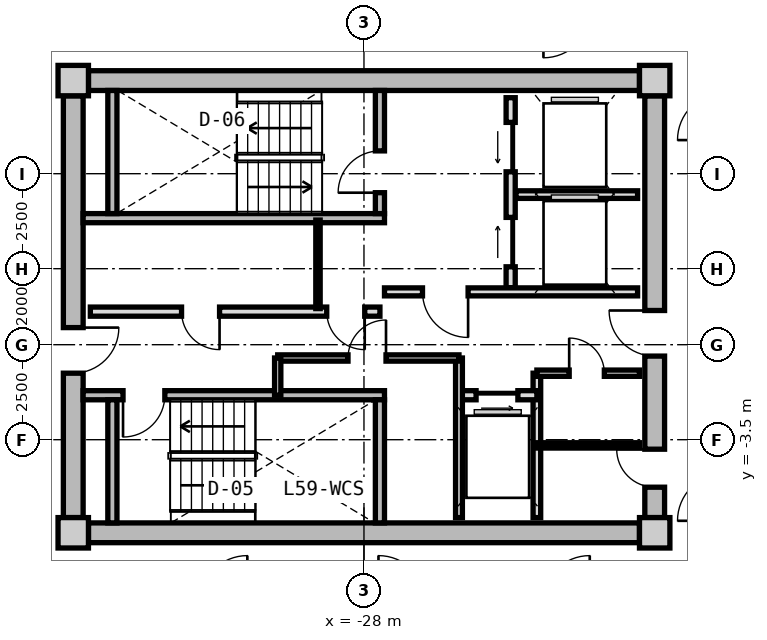
"""IFC4 building model, lengths in metres.
Left out: names, types, materials, properties, quantities, classifications, styles, units other than length and angle.
Written with IfcOpenShell. Run it as: python <this file> out.ifc"""

import sys

from ifc_helpers import new_model, si_unit, direction, frame, frame_2d, origin, origin_2d, place, context, subcontext, project, spatial, rectangle, extrude, source, transform, mapped, element, fill, save


model = new_model("IFC4")
c1 = context("Model", 3, precision=1e-05, world=origin(), true_north=direction((0.0, 1.0)))
c2 = subcontext(c1, "Body", "Model", "MODEL_VIEW")
j1 = project(units=[si_unit("LENGTHUNIT", "METRE"), si_unit("PLANEANGLEUNIT", "RADIAN")], contexts=[c1])
p1 = place(None, origin())
s1 = spatial("IfcSite", under=j1, at=p1, CompositionType="ELEMENT")
p2 = place(p1, origin())
s2 = spatial("IfcBuilding", under=s1, at=p2, CompositionType="ELEMENT")
p3 = place(p2, frame((0.0, 0.0, 190.65)))
s3 = spatial("IfcBuildingStorey", under=s2, at=p3, CompositionType="ELEMENT", Elevation=190.65)
m1 = source(origin(), c2, "Body", "SweptSolid", [
    extrude(rectangle(XDim=0.8, YDim=0.8, at=origin_2d()), origin(), (0.0, 0.0, 1.0), 3.05),
])
for number, where, z_axis, x_axis in (
    (1, (-35.65, -5.95, 0.0), (0.0, 0.0, 1.0), (1.0, 0.0, 0.0)),
    (2, (-20.35, -5.95, 0.0), (0.0, 0.0, 1.0), (1.0, 0.0, 0.0)),
    (3, (-20.35, 5.95, 0.0), (0.0, 0.0, 1.0), (1.0, 0.0, 0.0)),
    (4, (-35.65, 5.95, 0.0), (0.0, 0.0, 1.0), (1.0, 0.0, 0.0)),
):
    element("IfcColumn", number, at=place(p3, frame(where, z_axis=z_axis, x_axis=x_axis)), inside=s3, PredefinedType="COLUMN", context=c2, shape_type="MappedRepresentation", body=[
        mapped(m1, transform((0.0, 0.0, 0.0), x_axis=(1.0, 0.0, 0.0), y_axis=(0.0, 1.0, 0.0), z_axis=(0.0, 0.0, 1.0), scale=1.0)),
    ])
m2 = source(origin(), c2, "Body", "SweptSolid", [
    extrude(rectangle(XDim=14.5, YDim=0.52, at=frame_2d((7.25, 0.0))), origin(), (0.0, 0.0, 1.0), 2.81),
])
for number, where, z_axis, x_axis in (
    (5, (-35.25, 5.95, 0.0), (0.0, 0.0, 1.0), (1.0, 0.0, 0.0)),
    (6, (-20.75, -5.95, 0.0), (0.0, 0.0, 1.0), (-1.0, 0.0, 0.0)),
):
    element("IfcWall", number, at=place(p3, frame(where, z_axis=z_axis, x_axis=x_axis)), inside=s3, PredefinedType="SHEAR", context=c2, shape_type="MappedRepresentation", body=[
        mapped(m2, transform((0.0, 0.0, 0.0), x_axis=(1.0, 0.0, 0.0), y_axis=(0.0, 1.0, 0.0), z_axis=(0.0, 0.0, 1.0), scale=1.0)),
    ])
m3 = source(origin(), c2, "Body", "SweptSolid", [
    extrude(rectangle(XDim=11.1, YDim=0.52, at=frame_2d((5.55, 0.0))), origin(), (0.0, 0.0, 1.0), 2.81),
])
p4 = place(p3, frame((-35.65, -5.55, 0.0), z_axis=(0.0, 0.0, 1.0), x_axis=(0.0, 1.0, 0.0)))
e7 = element("IfcWall", 7, at=p4, inside=s3, PredefinedType="SHEAR", context=c2, shape_type="MappedRepresentation", body=[
    mapped(m3, transform((0.0, 0.0, 0.0), x_axis=(1.0, 0.0, 0.0), y_axis=(0.0, 1.0, 0.0), z_axis=(0.0, 0.0, 1.0), scale=1.0)),
])
p5 = place(p4, frame((3.8, 0.0, 0.0)))
e8 = element("IfcOpeningElement", 8, at=p5, cuts=e7, PredefinedType="OPENING", context=c2, shape_type="SweptSolid", body=[
    extrude(rectangle(XDim=1.2, YDim=2.15, at=frame_2d((0.6, 1.075))), frame((0.0, 0.27, 0.0), z_axis=(0.0, -1.0, 0.0), x_axis=(1.0, 0.0, 0.0)), (0.0, 0.0, 1.0), 0.54),
])
p6 = place(p3, frame((-20.35, 5.55, 0.0), z_axis=(0.0, 0.0, 1.0), x_axis=(0.0, -1.0, 0.0)))
e9 = element("IfcWall", 9, at=p6, inside=s3, PredefinedType="SHEAR", context=c2, shape_type="MappedRepresentation", body=[
    mapped(m3, transform((0.0, 0.0, 0.0), x_axis=(1.0, 0.0, 0.0), y_axis=(0.0, 1.0, 0.0), z_axis=(0.0, 0.0, 1.0), scale=1.0)),
])
p7 = place(p6, frame((5.65, 0.0, 0.0)))
e10 = element("IfcOpeningElement", 10, at=p7, cuts=e9, PredefinedType="OPENING", context=c2, shape_type="SweptSolid", body=[
    extrude(rectangle(XDim=1.2, YDim=2.15, at=frame_2d((0.6, 1.075))), frame((0.0, 0.27, 0.0), z_axis=(0.0, -1.0, 0.0), x_axis=(1.0, 0.0, 0.0)), (0.0, 0.0, 1.0), 0.54),
])
p8 = place(p6, frame((9.3, 0.0, 0.0)))
e11 = element("IfcOpeningElement", 11, at=p8, cuts=e9, PredefinedType="OPENING", context=c2, shape_type="SweptSolid", body=[
    extrude(rectangle(XDim=1.0, YDim=2.1, at=frame_2d((0.5, 1.05))), frame((0.0, 0.27, 0.0), z_axis=(0.0, -1.0, 0.0), x_axis=(1.0, 0.0, 0.0)), (0.0, 0.0, 1.0), 0.54),
])
m4 = source(origin(), c2, "Body", "SweptSolid", [
    extrude(rectangle(XDim=7.93, YDim=0.24, at=frame_2d((3.965, 0.0))), origin(), (0.0, 0.0, 1.0), 2.81),
])
p9 = place(p3, frame((-35.39, 2.33, 0.0), z_axis=(0.0, 0.0, 1.0), x_axis=(1.0, 0.0, 0.0)))
e12 = element("IfcWall", 12, at=p9, inside=s3, PredefinedType="PARTITIONING", context=c2, shape_type="MappedRepresentation", body=[
    mapped(m4, transform((0.0, 0.0, 0.0), x_axis=(1.0, 0.0, 0.0), y_axis=(0.0, 1.0, 0.0), z_axis=(0.0, 0.0, 1.0), scale=1.0)),
])
m5 = source(origin(), c2, "Body", "SweptSolid", [
    extrude(rectangle(XDim=3.24, YDim=0.24, at=frame_2d((1.62, 0.0))), origin(), (0.0, 0.0, 1.0), 2.81),
])
p10 = place(p3, frame((-34.62, 2.45, 0.0), z_axis=(0.0, 0.0, 1.0), x_axis=(0.0, 1.0, 0.0)))
e13 = element("IfcWall", 13, at=p10, inside=s3, PredefinedType="PARTITIONING", context=c2, shape_type="MappedRepresentation", body=[
    mapped(m5, transform((0.0, 0.0, 0.0), x_axis=(1.0, 0.0, 0.0), y_axis=(0.0, 1.0, 0.0), z_axis=(0.0, 0.0, 1.0), scale=1.0)),
])
p11 = place(p3, frame((-27.58, 2.45, 0.0), z_axis=(0.0, 0.0, 1.0), x_axis=(0.0, 1.0, 0.0)))
e14 = element("IfcWall", 14, at=p11, inside=s3, PredefinedType="PARTITIONING", context=c2, shape_type="MappedRepresentation", body=[
    mapped(m5, transform((0.0, 0.0, 0.0), x_axis=(1.0, 0.0, 0.0), y_axis=(0.0, 1.0, 0.0), z_axis=(0.0, 0.0, 1.0), scale=1.0)),
])
p12 = place(p11, frame((0.55, 0.0, 0.0)))
e15 = element("IfcOpeningElement", 15, at=p12, cuts=e14, PredefinedType="OPENING", context=c2, shape_type="SweptSolid", body=[
    extrude(rectangle(XDim=1.1, YDim=2.15, at=frame_2d((0.55, 1.075))), frame((0.0, 0.13, 0.0), z_axis=(0.0, -1.0, 0.0), x_axis=(1.0, 0.0, 0.0)), (0.0, 0.0, 1.0), 0.26),
])
p13 = place(p3, frame((-35.39, -2.33, 0.0), z_axis=(0.0, 0.0, 1.0), x_axis=(1.0, 0.0, 0.0)))
e16 = element("IfcWall", 16, at=p13, inside=s3, PredefinedType="PARTITIONING", context=c2, shape_type="MappedRepresentation", body=[
    mapped(m4, transform((0.0, 0.0, 0.0), x_axis=(1.0, 0.0, 0.0), y_axis=(0.0, 1.0, 0.0), z_axis=(0.0, 0.0, 1.0), scale=1.0)),
])
p14 = place(p13, frame((1.05, 0.0, 0.0)))
e17 = element("IfcOpeningElement", 17, at=p14, cuts=e16, PredefinedType="OPENING", context=c2, shape_type="SweptSolid", body=[
    extrude(rectangle(XDim=1.1, YDim=2.15, at=frame_2d((0.55, 1.075))), frame((0.0, 0.13, 0.0), z_axis=(0.0, -1.0, 0.0), x_axis=(1.0, 0.0, 0.0)), (0.0, 0.0, 1.0), 0.26),
])
for number, where, z_axis, x_axis in (
    (18, (-34.62, -5.69, 0.0), (0.0, 0.0, 1.0), (0.0, 1.0, 0.0)),
    (19, (-27.58, -5.69, 0.0), (0.0, 0.0, 1.0), (0.0, 1.0, 0.0)),
):
    element("IfcWall", number, at=place(p3, frame(where, z_axis=z_axis, x_axis=x_axis)), inside=s3, PredefinedType="PARTITIONING", context=c2, shape_type="MappedRepresentation", body=[
        mapped(m5, transform((0.0, 0.0, 0.0), x_axis=(1.0, 0.0, 0.0), y_axis=(0.0, 1.0, 0.0), z_axis=(0.0, 0.0, 1.0), scale=1.0)),
    ])
m6 = source(origin(), c2, "Body", "SweptSolid", [
    extrude(rectangle(XDim=5.0, YDim=0.24, at=frame_2d((2.5, 0.0))), origin(), (0.0, 0.0, 1.0), 2.795),
])
p15 = place(p3, frame((-24.14, 0.5, 0.0), z_axis=(0.0, 0.0, 1.0), x_axis=(0.0, 1.0, 0.0)))
e20 = element("IfcWall", 20, at=p15, inside=s3, PredefinedType="PARTITIONING", context=c2, shape_type="MappedRepresentation", body=[
    mapped(m6, transform((0.0, 0.0, 0.0), x_axis=(1.0, 0.0, 0.0), y_axis=(0.0, 1.0, 0.0), z_axis=(0.0, 0.0, 1.0), scale=1.0)),
])
p16 = place(p15, frame((3.05, 0.0, 0.0)))
e21 = element("IfcOpeningElement", 21, at=p16, cuts=e20, PredefinedType="OPENING", context=c2, shape_type="SweptSolid", body=[
    extrude(rectangle(XDim=1.3, YDim=2.2, at=frame_2d((0.65, 1.1))), frame((0.0, 0.13, 0.0), z_axis=(0.0, -1.0, 0.0), x_axis=(1.0, 0.0, 0.0)), (0.0, 0.0, 1.0), 0.26),
])
p17 = place(p15, frame((0.55, 0.0, 0.0)))
e22 = element("IfcOpeningElement", 22, at=p17, cuts=e20, PredefinedType="OPENING", context=c2, shape_type="SweptSolid", body=[
    extrude(rectangle(XDim=1.3, YDim=2.2, at=frame_2d((0.65, 1.1))), frame((0.0, 0.13, 0.0), z_axis=(0.0, -1.0, 0.0), x_axis=(1.0, 0.0, 0.0)), (0.0, 0.0, 1.0), 0.26),
])
m7 = source(origin(), c2, "Body", "SweptSolid", [
    extrude(rectangle(XDim=3.2, YDim=0.2, at=frame_2d((1.6, 0.0))), origin(), (0.0, 0.0, 1.0), 2.795),
])
p18 = place(p3, frame((-24.0, 2.95, 0.0), z_axis=(0.0, 0.0, 1.0), x_axis=(1.0, 0.0, 0.0)))
e23 = element("IfcWall", 23, at=p18, inside=s3, PredefinedType="PARTITIONING", context=c2, shape_type="MappedRepresentation", body=[
    mapped(m7, transform((0.0, 0.0, 0.0), x_axis=(1.0, 0.0, 0.0), y_axis=(0.0, 1.0, 0.0), z_axis=(0.0, 0.0, 1.0), scale=1.0)),
])
m8 = source(origin(), c2, "Body", "SweptSolid", [
    extrude(rectangle(XDim=6.66, YDim=0.21, at=frame_2d((3.33, 0.0))), origin(), (0.0, 0.0, 1.0), 2.795),
])
p19 = place(p3, frame((-27.46, 0.39, 0.0), z_axis=(0.0, 0.0, 1.0), x_axis=(1.0, 0.0, 0.0)))
e24 = element("IfcWall", 24, at=p19, inside=s3, PredefinedType="PARTITIONING", context=c2, shape_type="MappedRepresentation", body=[
    mapped(m8, transform((0.0, 0.0, 0.0), x_axis=(1.0, 0.0, 0.0), y_axis=(0.0, 1.0, 0.0), z_axis=(0.0, 0.0, 1.0), scale=1.0)),
])
p20 = place(p19, frame((1.0, 0.0, 0.0)))
e25 = element("IfcOpeningElement", 25, at=p20, cuts=e24, PredefinedType="OPENING", context=c2, shape_type="SweptSolid", body=[
    extrude(rectangle(XDim=1.2, YDim=2.15, at=frame_2d((0.6, 1.075))), frame((0.0, 0.115, 0.0), z_axis=(0.0, -1.0, 0.0), x_axis=(1.0, 0.0, 0.0)), (0.0, 0.0, 1.0), 0.23),
])
m9 = source(origin(), c2, "Body", "SweptSolid", [
    extrude(rectangle(XDim=7.62, YDim=0.24, at=frame_2d((3.81, 0.0))), origin(), (0.0, 0.0, 1.0), 2.795),
])
p21 = place(p3, frame((-35.2, -0.13, 0.0), z_axis=(0.0, 0.0, 1.0), x_axis=(1.0, 0.0, 0.0)))
e26 = element("IfcWall", 26, at=p21, inside=s3, PredefinedType="PARTITIONING", context=c2, shape_type="MappedRepresentation", body=[
    mapped(m9, transform((0.0, 0.0, 0.0), x_axis=(1.0, 0.0, 0.0), y_axis=(0.0, 1.0, 0.0), z_axis=(0.0, 0.0, 1.0), scale=1.0)),
])
p22 = place(p21, frame((6.22, 0.0, 0.0)))
e27 = element("IfcOpeningElement", 27, at=p22, cuts=e26, PredefinedType="OPENING", context=c2, shape_type="SweptSolid", body=[
    extrude(rectangle(XDim=1.0, YDim=2.1, at=frame_2d((0.5, 1.05))), frame((0.0, 0.13, 0.0), z_axis=(0.0, -1.0, 0.0), x_axis=(1.0, 0.0, 0.0)), (0.0, 0.0, 1.0), 0.26),
])
p23 = place(p21, frame((2.4, 0.0, 0.0)))
e28 = element("IfcOpeningElement", 28, at=p23, cuts=e26, PredefinedType="OPENING", context=c2, shape_type="SweptSolid", body=[
    extrude(rectangle(XDim=1.0, YDim=2.1, at=frame_2d((0.5, 1.05))), frame((0.0, 0.13, 0.0), z_axis=(0.0, -1.0, 0.0), x_axis=(1.0, 0.0, 0.0)), (0.0, 0.0, 1.0), 0.26),
])
m10 = source(origin(), c2, "Body", "SweptSolid", [
    extrude(rectangle(XDim=2.33, YDim=0.115, at=frame_2d((1.165, 0.0))), origin(), (0.0, 0.0, 1.0), 2.795),
])
p24 = place(p3, frame((-29.21, -0.05, 0.0), z_axis=(0.0, 0.0, 1.0), x_axis=(0.0, 1.0, 0.0)))
e29 = element("IfcWall", 29, at=p24, inside=s3, PredefinedType="PARTITIONING", context=c2, shape_type="MappedRepresentation", body=[
    mapped(m10, transform((0.0, 0.0, 0.0), x_axis=(1.0, 0.0, 0.0), y_axis=(0.0, 1.0, 0.0), z_axis=(0.0, 0.0, 1.0), scale=1.0)),
])
m11 = source(origin(), c2, "Body", "SweptSolid", [
    extrude(rectangle(XDim=3.8, YDim=0.2, at=frame_2d((1.9, 0.0))), origin(), (0.0, 0.0, 1.0), 2.795),
])
p25 = place(p3, frame((-23.45, -5.55, 0.0), z_axis=(0.0, 0.0, 1.0), x_axis=(0.0, 1.0, 0.0)))
e30 = element("IfcWall", 30, at=p25, inside=s3, PredefinedType="PARTITIONING", context=c2, shape_type="MappedRepresentation", body=[
    mapped(m11, transform((0.0, 0.0, 0.0), x_axis=(1.0, 0.0, 0.0), y_axis=(0.0, 1.0, 0.0), z_axis=(0.0, 0.0, 1.0), scale=1.0)),
])
m12 = source(origin(), c2, "Body", "SweptSolid", [
    extrude(rectangle(XDim=2.05, YDim=0.24, at=frame_2d((1.025, 0.0))), origin(), (0.0, 0.0, 1.0), 2.795),
])
p26 = place(p3, frame((-25.5, -2.33, 0.0), z_axis=(0.0, 0.0, 1.0), x_axis=(1.0, 0.0, 0.0)))
e31 = element("IfcWall", 31, at=p26, inside=s3, PredefinedType="PARTITIONING", context=c2, shape_type="MappedRepresentation", body=[
    mapped(m12, transform((0.0, 0.0, 0.0), x_axis=(1.0, 0.0, 0.0), y_axis=(0.0, 1.0, 0.0), z_axis=(0.0, 0.0, 1.0), scale=1.0)),
])
p27 = place(p26, frame((0.45, 0.0, 0.0)))
e32 = element("IfcOpeningElement", 32, at=p27, cuts=e31, PredefinedType="OPENING", context=c2, shape_type="SweptSolid", body=[
    extrude(rectangle(XDim=1.1, YDim=2.2, at=frame_2d((0.55, 1.1))), frame((0.0, 0.13, 0.0), z_axis=(0.0, -1.0, 0.0), x_axis=(1.0, 0.0, 0.0)), (0.0, 0.0, 1.0), 0.26),
])
m13 = source(origin(), c2, "Body", "SweptSolid", [
    extrude(rectangle(XDim=4.2, YDim=0.18, at=frame_2d((2.1, 0.0))), origin(), (0.0, 0.0, 1.0), 2.795),
])
p28 = place(p3, frame((-25.5, -5.55, 0.0), z_axis=(0.0, 0.0, 1.0), x_axis=(0.0, 1.0, 0.0)))
e33 = element("IfcWall", 33, at=p28, inside=s3, PredefinedType="PARTITIONING", context=c2, shape_type="MappedRepresentation", body=[
    mapped(m13, transform((0.0, 0.0, 0.0), x_axis=(1.0, 0.0, 0.0), y_axis=(0.0, 1.0, 0.0), z_axis=(0.0, 0.0, 1.0), scale=1.0)),
])
m14 = source(origin(), c2, "Body", "SweptSolid", [
    extrude(rectangle(XDim=4.77, YDim=0.165, at=frame_2d((2.385, 0.0))), origin(), (0.0, 0.0, 1.0), 2.795),
])
p29 = place(p3, frame((-30.27, -1.35, 0.0), z_axis=(0.0, 0.0, 1.0), x_axis=(1.0, 0.0, 0.0)))
e34 = element("IfcWall", 34, at=p29, inside=s3, PredefinedType="PARTITIONING", context=c2, shape_type="MappedRepresentation", body=[
    mapped(m14, transform((0.0, 0.0, 0.0), x_axis=(1.0, 0.0, 0.0), y_axis=(0.0, 1.0, 0.0), z_axis=(0.0, 0.0, 1.0), scale=1.0)),
])
p30 = place(p29, frame((1.85, 0.0, 0.0)))
e35 = element("IfcOpeningElement", 35, at=p30, cuts=e34, PredefinedType="OPENING", context=c2, shape_type="SweptSolid", body=[
    extrude(rectangle(XDim=1.0, YDim=2.1, at=frame_2d((0.5, 1.05))), frame((0.0, 0.093, 0.0), z_axis=(0.0, -1.0, 0.0), x_axis=(1.0, 0.0, 0.0)), (0.0, 0.0, 1.0), 0.185),
])
m15 = source(origin(), c2, "Body", "SweptSolid", [
    extrude(rectangle(XDim=0.98, YDim=0.165, at=frame_2d((0.49, 0.0))), origin(), (0.0, 0.0, 1.0), 2.795),
])
p31 = place(p3, frame((-30.27, -2.33, 0.0), z_axis=(0.0, 0.0, 1.0), x_axis=(0.0, 1.0, 0.0)))
e36 = element("IfcWall", 36, at=p31, inside=s3, PredefinedType="PARTITIONING", context=c2, shape_type="MappedRepresentation", body=[
    mapped(m15, transform((0.0, 0.0, 0.0), x_axis=(1.0, 0.0, 0.0), y_axis=(0.0, 1.0, 0.0), z_axis=(0.0, 0.0, 1.0), scale=1.0)),
])
m16 = source(origin(), c2, "Body", "SweptSolid", [
    extrude(rectangle(XDim=2.7, YDim=0.165, at=frame_2d((1.35, 0.0))), origin(), (0.0, 0.0, 1.0), 2.795),
])
p32 = place(p3, frame((-23.45, -1.75, 0.0), z_axis=(0.0, 0.0, 1.0), x_axis=(1.0, 0.0, 0.0)))
e37 = element("IfcWall", 37, at=p32, inside=s3, PredefinedType="PARTITIONING", context=c2, shape_type="MappedRepresentation", body=[
    mapped(m16, transform((0.0, 0.0, 0.0), x_axis=(1.0, 0.0, 0.0), y_axis=(0.0, 1.0, 0.0), z_axis=(0.0, 0.0, 1.0), scale=1.0)),
])
p33 = place(p32, frame((0.85, 0.0, 0.0)))
e38 = element("IfcOpeningElement", 38, at=p33, cuts=e37, PredefinedType="OPENING", context=c2, shape_type="SweptSolid", body=[
    extrude(rectangle(XDim=0.925, YDim=2.1, at=frame_2d((0.462, 1.05))), frame((0.0, 0.093, 0.0), z_axis=(0.0, -1.0, 0.0), x_axis=(1.0, 0.0, 0.0)), (0.0, 0.0, 1.0), 0.185),
])
m17 = source(origin(), c2, "Body", "SweptSolid", [
    extrude(rectangle(XDim=2.7, YDim=0.14, at=frame_2d((1.35, 0.0))), origin(), (0.0, 0.0, 1.0), 2.795),
])
p34 = place(p3, frame((-23.45, -3.65, 0.0), z_axis=(0.0, 0.0, 1.0), x_axis=(1.0, 0.0, 0.0)))
e39 = element("IfcWall", 39, at=p34, inside=s3, PredefinedType="PARTITIONING", context=c2, shape_type="MappedRepresentation", body=[
    mapped(m17, transform((0.0, 0.0, 0.0), x_axis=(1.0, 0.0, 0.0), y_axis=(0.0, 1.0, 0.0), z_axis=(0.0, 0.0, 1.0), scale=1.0)),
])
m18 = source(origin(), c2, "Body", "SweptSolid", [
    extrude(rectangle(XDim=1.1, YDim=2.15, at=frame_2d((0.55, 1.075))), frame((0.0, 0.025, 0.0), z_axis=(0.0, -1.0, 0.0), x_axis=(1.0, 0.0, 0.0)), (0.0, 0.0, 1.0), 0.05),
])
p35 = place(p12, origin())
e40 = element("IfcDoor", 40, at=p35, inside=s3, OperationType="SINGLE_SWING_LEFT", PredefinedType="DOOR", context=c2, shape_type="MappedRepresentation", body=[
    mapped(m18, transform((0.0, 0.0, 0.0), x_axis=(1.0, 0.0, 0.0), y_axis=(0.0, 1.0, 0.0), z_axis=(0.0, 0.0, 1.0), scale=1.0)),
])
fill(e15, e40)
p36 = place(p14, frame((1.1, 0.0, 0.0), z_axis=(0.0, 0.0, 1.0), x_axis=(-1.0, 0.0, 0.0)))
e41 = element("IfcDoor", 41, at=p36, inside=s3, OperationType="SINGLE_SWING_RIGHT", PredefinedType="DOOR", context=c2, shape_type="MappedRepresentation", body=[
    mapped(m18, transform((0.0, 0.0, 0.0), x_axis=(1.0, 0.0, 0.0), y_axis=(0.0, 1.0, 0.0), z_axis=(0.0, 0.0, 1.0), scale=1.0)),
])
fill(e17, e41)
m19 = source(origin(), c2, "Body", "SweptSolid", [
    extrude(rectangle(XDim=1.3, YDim=2.2, at=frame_2d((0.65, 1.1))), frame((0.0, 0.025, 0.0), z_axis=(0.0, -1.0, 0.0), x_axis=(1.0, 0.0, 0.0)), (0.0, 0.0, 1.0), 0.05),
])
p37 = place(p16, origin())
e42 = element("IfcDoor", 42, at=p37, inside=s3, OperationType="SLIDING_TO_LEFT", PredefinedType="DOOR", context=c2, shape_type="MappedRepresentation", body=[
    mapped(m19, transform((0.0, 0.0, 0.0), x_axis=(1.0, 0.0, 0.0), y_axis=(0.0, 1.0, 0.0), z_axis=(0.0, 0.0, 1.0), scale=1.0)),
])
fill(e21, e42)
p38 = place(p17, origin())
e43 = element("IfcDoor", 43, at=p38, inside=s3, OperationType="SLIDING_TO_RIGHT", PredefinedType="DOOR", context=c2, shape_type="MappedRepresentation", body=[
    mapped(m19, transform((0.0, 0.0, 0.0), x_axis=(1.0, 0.0, 0.0), y_axis=(0.0, 1.0, 0.0), z_axis=(0.0, 0.0, 1.0), scale=1.0)),
])
fill(e22, e43)
m20 = source(origin(), c2, "Body", "SweptSolid", [
    extrude(rectangle(XDim=1.2, YDim=2.15, at=frame_2d((0.6, 1.075))), frame((0.0, 0.025, 0.0), z_axis=(0.0, -1.0, 0.0), x_axis=(1.0, 0.0, 0.0)), (0.0, 0.0, 1.0), 0.05),
])
p39 = place(p20, frame((1.2, 0.0, 0.0), z_axis=(0.0, 0.0, 1.0), x_axis=(-1.0, 0.0, 0.0)))
e44 = element("IfcDoor", 44, at=p39, inside=s3, OperationType="SINGLE_SWING_LEFT", PredefinedType="DOOR", context=c2, shape_type="MappedRepresentation", body=[
    mapped(m20, transform((0.0, 0.0, 0.0), x_axis=(1.0, 0.0, 0.0), y_axis=(0.0, 1.0, 0.0), z_axis=(0.0, 0.0, 1.0), scale=1.0)),
])
fill(e25, e44)
p40 = place(p5, frame((1.2, 0.0, 0.0), z_axis=(0.0, 0.0, 1.0), x_axis=(-1.0, 0.0, 0.0)))
e45 = element("IfcDoor", 45, at=p40, inside=s3, OperationType="SINGLE_SWING_LEFT", PredefinedType="DOOR", context=c2, shape_type="MappedRepresentation", body=[
    mapped(m20, transform((0.0, 0.0, 0.0), x_axis=(1.0, 0.0, 0.0), y_axis=(0.0, 1.0, 0.0), z_axis=(0.0, 0.0, 1.0), scale=1.0)),
])
fill(e8, e45)
p41 = place(p7, frame((1.2, 0.0, 0.0), z_axis=(0.0, 0.0, 1.0), x_axis=(-1.0, 0.0, 0.0)))
e46 = element("IfcDoor", 46, at=p41, inside=s3, OperationType="SINGLE_SWING_RIGHT", PredefinedType="DOOR", context=c2, shape_type="MappedRepresentation", body=[
    mapped(m20, transform((0.0, 0.0, 0.0), x_axis=(1.0, 0.0, 0.0), y_axis=(0.0, 1.0, 0.0), z_axis=(0.0, 0.0, 1.0), scale=1.0)),
])
fill(e10, e46)
m21 = source(origin(), c2, "Body", "SweptSolid", [
    extrude(rectangle(XDim=1.0, YDim=2.1, at=frame_2d((0.5, 1.05))), frame((0.0, 0.025, 0.0), z_axis=(0.0, -1.0, 0.0), x_axis=(1.0, 0.0, 0.0)), (0.0, 0.0, 1.0), 0.05),
])
p42 = place(p22, frame((1.0, 0.0, 0.0), z_axis=(0.0, 0.0, 1.0), x_axis=(-1.0, 0.0, 0.0)))
e47 = element("IfcDoor", 47, at=p42, inside=s3, OperationType="SINGLE_SWING_LEFT", PredefinedType="DOOR", context=c2, shape_type="MappedRepresentation", body=[
    mapped(m21, transform((0.0, 0.0, 0.0), x_axis=(1.0, 0.0, 0.0), y_axis=(0.0, 1.0, 0.0), z_axis=(0.0, 0.0, 1.0), scale=1.0)),
])
fill(e27, e47)
p43 = place(p23, frame((1.0, 0.0, 0.0), z_axis=(0.0, 0.0, 1.0), x_axis=(-1.0, 0.0, 0.0)))
e48 = element("IfcDoor", 48, at=p43, inside=s3, OperationType="SINGLE_SWING_LEFT", PredefinedType="DOOR", context=c2, shape_type="MappedRepresentation", body=[
    mapped(m21, transform((0.0, 0.0, 0.0), x_axis=(1.0, 0.0, 0.0), y_axis=(0.0, 1.0, 0.0), z_axis=(0.0, 0.0, 1.0), scale=1.0)),
])
fill(e28, e48)
m22 = source(origin(), c2, "Body", "SweptSolid", [
    extrude(rectangle(XDim=1.1, YDim=2.2, at=frame_2d((0.55, 1.1))), frame((0.0, 0.025, 0.0), z_axis=(0.0, -1.0, 0.0), x_axis=(1.0, 0.0, 0.0)), (0.0, 0.0, 1.0), 0.05),
])
p44 = place(p27, frame((1.1, 0.0, 0.0), z_axis=(0.0, 0.0, 1.0), x_axis=(-1.0, 0.0, 0.0)))
e49 = element("IfcDoor", 49, at=p44, inside=s3, OperationType="SLIDING_TO_RIGHT", PredefinedType="DOOR", context=c2, shape_type="MappedRepresentation", body=[
    mapped(m22, transform((0.0, 0.0, 0.0), x_axis=(1.0, 0.0, 0.0), y_axis=(0.0, 1.0, 0.0), z_axis=(0.0, 0.0, 1.0), scale=1.0)),
])
fill(e32, e49)
p45 = place(p30, origin())
e50 = element("IfcDoor", 50, at=p45, inside=s3, OperationType="SINGLE_SWING_RIGHT", PredefinedType="DOOR", context=c2, shape_type="MappedRepresentation", body=[
    mapped(m21, transform((0.0, 0.0, 0.0), x_axis=(1.0, 0.0, 0.0), y_axis=(0.0, 1.0, 0.0), z_axis=(0.0, 0.0, 1.0), scale=1.0)),
])
fill(e35, e50)
m23 = source(origin(), c2, "Body", "SweptSolid", [
    extrude(rectangle(XDim=0.925, YDim=2.1, at=frame_2d((0.462, 1.05))), frame((0.0, 0.025, 0.0), z_axis=(0.0, -1.0, 0.0), x_axis=(1.0, 0.0, 0.0)), (0.0, 0.0, 1.0), 0.05),
])
p46 = place(p33, origin())
e51 = element("IfcDoor", 51, at=p46, inside=s3, OperationType="SINGLE_SWING_LEFT", PredefinedType="DOOR", context=c2, shape_type="MappedRepresentation", body=[
    mapped(m23, transform((0.0, 0.0, 0.0), x_axis=(1.0, 0.0, 0.0), y_axis=(0.0, 1.0, 0.0), z_axis=(0.0, 0.0, 1.0), scale=1.0)),
])
fill(e38, e51)
p47 = place(p8, frame((1.0, 0.0, 0.0), z_axis=(0.0, 0.0, 1.0), x_axis=(-1.0, 0.0, 0.0)))
e52 = element("IfcDoor", 52, at=p47, inside=s3, OperationType="SINGLE_SWING_RIGHT", PredefinedType="DOOR", context=c2, shape_type="MappedRepresentation", body=[
    mapped(m21, transform((0.0, 0.0, 0.0), x_axis=(1.0, 0.0, 0.0), y_axis=(0.0, 1.0, 0.0), z_axis=(0.0, 0.0, 1.0), scale=1.0)),
])
fill(e11, e52)
save(model, sys.argv[1])
